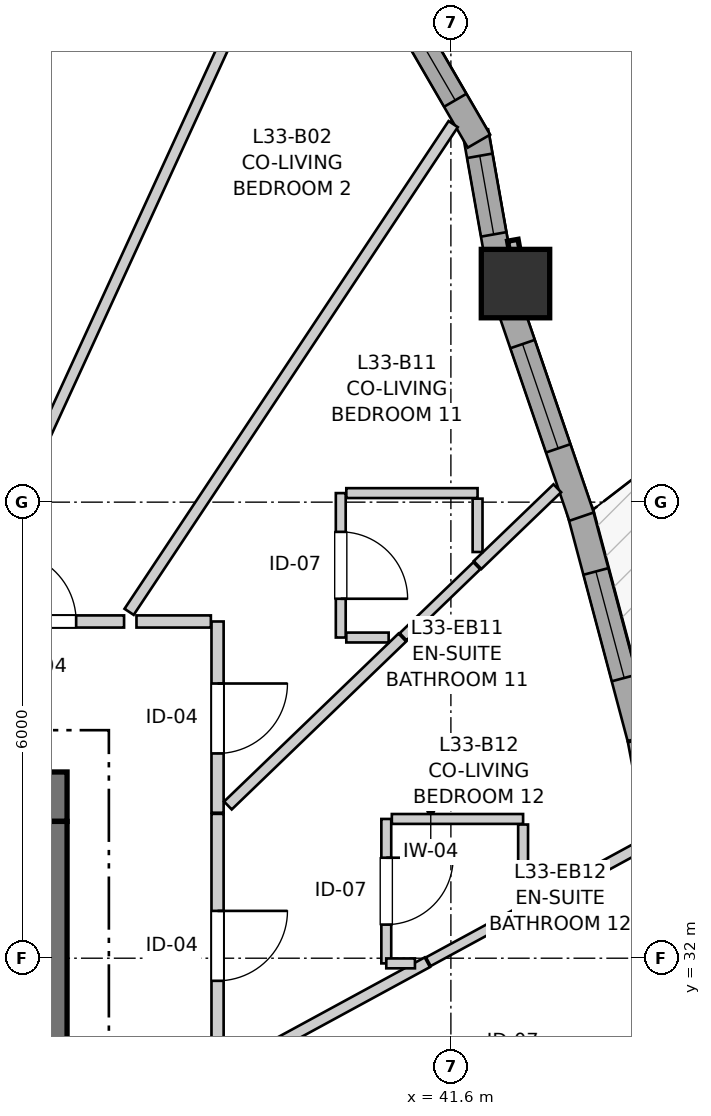
"""IFC4 building model, lengths in metres.
Left out: names, types, materials, properties, quantities, classifications, styles, units other than length and angle.
Written with IfcOpenShell. Run it as: python <this file> out.ifc"""

import sys

from ifc_helpers import new_model, si_unit, direction, frame, frame_2d, origin, origin_2d, place, context, subcontext, project, spatial, rectangle, extrude, source, transform, mapped, element, fill, save


model = new_model("IFC4")
c1 = context("Model", 3, precision=1e-05, world=origin(), true_north=direction((0.0, 1.0)))
c2 = subcontext(c1, "Body", "Model", "MODEL_VIEW")
j1 = project(units=[si_unit("LENGTHUNIT", "METRE"), si_unit("PLANEANGLEUNIT", "RADIAN")], contexts=[c1])
p1 = place(None, origin())
s1 = spatial("IfcSite", under=j1, at=p1, CompositionType="ELEMENT")
p2 = place(p1, origin())
s2 = spatial("IfcBuilding", under=s1, at=p2, CompositionType="ELEMENT")
p3 = place(p2, frame((0.0, 0.0, 112.0)))
s3 = spatial("IfcBuildingStorey", under=s2, at=p3, CompositionType="ELEMENT", Elevation=112.0)
p4 = place(p3, frame((36.55, 34.125, 0.0), z_axis=(0.0, 0.0, 1.0), x_axis=(-1.0, 0.0, 0.0)))
e1 = element("IfcWall", 1, at=p4, inside=s3, PredefinedType="SHEAR", context=c2, shape_type="SweptSolid", body=[
    extrude(rectangle(XDim=12.4, YDim=0.65, at=frame_2d((6.2, 0.0))), origin(), (0.0, 0.0, 1.0), 2.935),
])
p5 = place(p3, frame((36.225, 18.2, 0.0), z_axis=(0.0, 0.0, 1.0), x_axis=(0.0, 1.0, 0.0)))
e2 = element("IfcWall", 2, at=p5, inside=s3, PredefinedType="SHEAR", context=c2, shape_type="SweptSolid", body=[
    extrude(rectangle(XDim=15.6, YDim=0.65, at=frame_2d((7.8, 0.0))), origin(), (0.0, 0.0, 1.0), 2.935),
])
p6 = place(p5, frame((4.25, 0.0, 0.0)))
e3 = element("IfcOpeningElement", 3, at=p6, cuts=e2, PredefinedType="OPENING", context=c2, shape_type="SweptSolid", body=[
    extrude(rectangle(XDim=1.1, YDim=2.15, at=frame_2d((0.55, 1.075))), frame((0.0, 0.335, 0.0), z_axis=(0.0, -1.0, 0.0), x_axis=(1.0, 0.0, 0.0)), (0.0, 0.0, 1.0), 0.67),
])
p7 = place(p5, frame((10.25, 0.0, 0.0)))
e4 = element("IfcOpeningElement", 4, at=p7, cuts=e2, PredefinedType="OPENING", context=c2, shape_type="SweptSolid", body=[
    extrude(rectangle(XDim=1.1, YDim=2.15, at=frame_2d((0.55, 1.075))), frame((0.0, 0.335, 0.0), z_axis=(0.0, -1.0, 0.0), x_axis=(1.0, 0.0, 0.0)), (0.0, 0.0, 1.0), 0.67),
])
m1 = source(origin(), c2, "Body", "SweptSolid", [
    extrude(rectangle(XDim=0.9, YDim=0.9, at=origin_2d()), origin(), (0.0, 0.0, 1.0), 2.935),
])
p8 = place(p3, frame((42.45, 40.875, 0.0), z_axis=(0.0, 0.0, 1.0), x_axis=(1.0, 0.0, 0.0)))
e5 = element("IfcColumn", 5, at=p8, inside=s3, PredefinedType="COLUMN", context=c2, shape_type="MappedRepresentation", body=[
    mapped(m1, transform((0.0, 0.0, 0.0), x_axis=(1.0, 0.0, 0.0), y_axis=(0.0, 1.0, 0.0), z_axis=(0.0, 0.0, 1.0), scale=1.0)),
])
p9 = place(p3, frame((44.664, 31.881, 0.0), z_axis=(0.0, 0.0, 1.0), x_axis=(-0.18665909876, 0.982424745642, 0.0)))
e6 = element("IfcWall", 6, at=p9, inside=s3, PredefinedType="SOLIDWALL", context=c2, shape_type="SweptSolid", body=[
    extrude(rectangle(XDim=3.046, YDim=0.34, at=frame_2d((1.523, 0.0))), origin(), (0.0, 0.0, 1.0), 2.465),
])
p10 = place(p9, frame((0.416, 0.0, 0.82)))
e7 = element("IfcOpeningElement", 7, at=p10, cuts=e6, PredefinedType="OPENING", context=c2, shape_type="SweptSolid", body=[
    extrude(rectangle(XDim=0.95, YDim=1.35, at=frame_2d((0.475, 0.675))), frame((0.0, 0.18, 0.0), z_axis=(0.0, -1.0, 0.0), x_axis=(1.0, 0.0, 0.0)), (0.0, 0.0, 1.0), 0.36),
])
p11 = place(p9, frame((2.054, 0.0, 0.82)))
e8 = element("IfcOpeningElement", 8, at=p11, cuts=e6, PredefinedType="OPENING", context=c2, shape_type="SweptSolid", body=[
    extrude(rectangle(XDim=0.58, YDim=1.35, at=frame_2d((0.29, 0.675))), frame((0.0, 0.18, 0.0), z_axis=(0.0, -1.0, 0.0), x_axis=(1.0, 0.0, 0.0)), (0.0, 0.0, 1.0), 0.36),
])
p12 = place(p3, frame((44.09, 34.901, 0.0), z_axis=(0.0, 0.0, 1.0), x_axis=(-0.257108087637, 0.966382652613, 0.0)))
e9 = element("IfcWall", 9, at=p12, inside=s3, PredefinedType="SOLIDWALL", context=c2, shape_type="SweptSolid", body=[
    extrude(rectangle(XDim=3.096, YDim=0.34, at=frame_2d((1.548, 0.0))), origin(), (0.0, 0.0, 1.0), 2.465),
])
p13 = place(p12, frame((0.813, 0.0, 0.82)))
e10 = element("IfcOpeningElement", 10, at=p13, cuts=e9, PredefinedType="OPENING", context=c2, shape_type="SweptSolid", body=[
    extrude(rectangle(XDim=1.45, YDim=1.25, at=frame_2d((0.725, 0.625))), frame((0.0, 0.18, 0.0), z_axis=(0.0, -1.0, 0.0), x_axis=(1.0, 0.0, 0.0)), (0.0, 0.0, 1.0), 0.36),
])
p14 = place(p3, frame((43.319, 37.809, 0.0), z_axis=(0.0, 0.0, 1.0), x_axis=(-0.323586371726, 0.946198636669, 0.0)))
e11 = element("IfcWall", 11, at=p14, inside=s3, PredefinedType="SOLIDWALL", context=c2, shape_type="SweptSolid", body=[
    extrude(rectangle(XDim=2.952, YDim=0.34, at=frame_2d((1.476, 0.0))), origin(), (0.0, 0.0, 1.0), 2.465),
])
p15 = place(p14, frame((0.949, 0.0, 0.82)))
e12 = element("IfcOpeningElement", 12, at=p15, cuts=e11, PredefinedType="OPENING", context=c2, shape_type="SweptSolid", body=[
    extrude(rectangle(XDim=1.45, YDim=1.25, at=frame_2d((0.725, 0.625))), frame((0.0, 0.18, 0.0), z_axis=(0.0, -1.0, 0.0), x_axis=(1.0, 0.0, 0.0)), (0.0, 0.0, 1.0), 0.36),
])
p16 = place(p3, frame((42.242, 41.072, 0.0), z_axis=(0.0, 0.0, 1.0), x_axis=(-0.17440141227, 0.984674640375, 0.0)))
e13 = element("IfcWall", 13, at=p16, inside=s3, PredefinedType="SOLIDWALL", context=c2, shape_type="SweptSolid", body=[
    extrude(rectangle(XDim=1.831, YDim=0.34, at=frame_2d((0.916, 0.0))), origin(), (0.0, 0.0, 1.0), 2.465),
])
p17 = place(p16, frame((0.457, 0.0, 0.82)))
e14 = element("IfcOpeningElement", 14, at=p17, cuts=e13, PredefinedType="OPENING", context=c2, shape_type="SweptSolid", body=[
    extrude(rectangle(XDim=1.05, YDim=1.45, at=frame_2d((0.525, 0.725))), frame((0.0, 0.18, 0.0), z_axis=(0.0, -1.0, 0.0), x_axis=(1.0, 0.0, 0.0)), (0.0, 0.0, 1.0), 0.36),
])
p18 = place(p3, frame((41.969, 42.749, 0.0), z_axis=(0.0, 0.0, 1.0), x_axis=(-0.501989603552, 0.864873654313, 0.0)))
e15 = element("IfcWall", 15, at=p18, inside=s3, PredefinedType="SOLIDWALL", context=c2, shape_type="SweptSolid", body=[
    extrude(rectangle(XDim=2.099, YDim=0.34, at=frame_2d((1.05, 0.0))), origin(), (0.0, 0.0, 1.0), 2.465),
])
p19 = place(p18, frame((0.622, 0.0, 0.82)))
e16 = element("IfcOpeningElement", 16, at=p19, cuts=e15, PredefinedType="OPENING", context=c2, shape_type="SweptSolid", body=[
    extrude(rectangle(XDim=1.15, YDim=1.2, at=frame_2d((0.575, 0.6))), frame((0.0, 0.18, 0.0), z_axis=(0.0, -1.0, 0.0), x_axis=(1.0, 0.0, 0.0)), (0.0, 0.0, 1.0), 0.36),
])
p20 = place(p3, frame((38.53, 33.899, 0.0), z_axis=(0.0, 0.0, 1.0), x_axis=(0.0, -1.0, 0.0)))
e17 = element("IfcWall", 17, at=p20, inside=s3, PredefinedType="PARTITIONING", context=c2, shape_type="SweptSolid", body=[
    extrude(rectangle(XDim=3.469, YDim=0.16, at=frame_2d((1.734, 0.0))), origin(), (0.0, 0.0, 1.0), 2.935),
])
p21 = place(p20, frame((1.277, 0.0, 0.0)))
e18 = element("IfcOpeningElement", 18, at=p21, cuts=e17, PredefinedType="OPENING", context=c2, shape_type="SweptSolid", body=[
    extrude(rectangle(XDim=0.92, YDim=2.1, at=frame_2d((0.46, 1.05))), frame((0.0, 0.09, 0.0), z_axis=(0.0, -1.0, 0.0), x_axis=(1.0, 0.0, 0.0)), (0.0, 0.0, 1.0), 0.18),
])
p22 = place(p3, frame((38.53, 36.43, 0.0), z_axis=(0.0, 0.0, 1.0), x_axis=(0.0, -1.0, 0.0)))
e19 = element("IfcWall", 19, at=p22, inside=s3, PredefinedType="PARTITIONING", context=c2, shape_type="SweptSolid", body=[
    extrude(rectangle(XDim=2.516, YDim=0.16, at=frame_2d((1.258, 0.0))), origin(), (0.0, 0.0, 1.0), 2.573),
])
p23 = place(p22, frame((0.816, 0.0, 0.0)))
e20 = element("IfcOpeningElement", 20, at=p23, cuts=e19, PredefinedType="OPENING", context=c2, shape_type="SweptSolid", body=[
    extrude(rectangle(XDim=0.92, YDim=2.1, at=frame_2d((0.46, 1.05))), frame((0.0, 0.09, 0.0), z_axis=(0.0, -1.0, 0.0), x_axis=(1.0, 0.0, 0.0)), (0.0, 0.0, 1.0), 0.18),
])
p24 = place(p3, frame((35.121, 36.43, 0.0), z_axis=(0.0, 0.0, 1.0), x_axis=(1.0, 0.0, 0.0)))
e21 = element("IfcWall", 21, at=p24, inside=s3, PredefinedType="PARTITIONING", context=c2, shape_type="SweptSolid", body=[
    extrude(rectangle(XDim=2.179, YDim=0.16, at=frame_2d((1.089, 0.0))), origin(), (0.0, 0.0, 1.0), 2.573),
])
p25 = place(p24, frame((0.628, 0.0, 0.0)))
e22 = element("IfcOpeningElement", 22, at=p25, cuts=e21, PredefinedType="OPENING", context=c2, shape_type="SweptSolid", body=[
    extrude(rectangle(XDim=0.92, YDim=2.1, at=frame_2d((0.46, 1.05))), frame((0.0, 0.09, 0.0), z_axis=(0.0, -1.0, 0.0), x_axis=(1.0, 0.0, 0.0)), (0.0, 0.0, 1.0), 0.18),
])
p26 = place(p3, frame((40.75, 33.832, 0.0), z_axis=(0.0, 0.0, 1.0), x_axis=(0.0, -1.0, 0.0)))
e23 = element("IfcWall", 23, at=p26, inside=s3, PredefinedType="PARTITIONING", context=c2, shape_type="SweptSolid", body=[
    extrude(rectangle(XDim=1.9, YDim=0.13, at=frame_2d((0.95, 0.0))), origin(), (0.0, 0.0, 1.0), 2.935),
])
p27 = place(p26, frame((0.51, 0.0, 0.0)))
e24 = element("IfcOpeningElement", 24, at=p27, cuts=e23, PredefinedType="OPENING", context=c2, shape_type="SweptSolid", body=[
    extrude(rectangle(XDim=0.88, YDim=2.05, at=frame_2d((0.44, 1.025))), frame((0.0, 0.075, 0.0), z_axis=(0.0, -1.0, 0.0), x_axis=(1.0, 0.0, 0.0)), (0.0, 0.0, 1.0), 0.15),
])
p28 = place(p3, frame((40.151, 38.119, 0.0), z_axis=(0.0, 0.0, 1.0), x_axis=(0.0, -1.0, 0.0)))
e25 = element("IfcWall", 25, at=p28, inside=s3, PredefinedType="PARTITIONING", context=c2, shape_type="SweptSolid", body=[
    extrude(rectangle(XDim=1.9, YDim=0.13, at=frame_2d((0.95, 0.0))), origin(), (0.0, 0.0, 1.0), 2.935),
])
p29 = place(p28, frame((0.51, 0.0, 0.0)))
e26 = element("IfcOpeningElement", 26, at=p29, cuts=e25, PredefinedType="OPENING", context=c2, shape_type="SweptSolid", body=[
    extrude(rectangle(XDim=0.88, YDim=2.05, at=frame_2d((0.44, 1.025))), frame((0.0, 0.075, 0.0), z_axis=(0.0, -1.0, 0.0), x_axis=(1.0, 0.0, 0.0)), (0.0, 0.0, 1.0), 0.15),
])
p30 = place(p3, frame((35.191, 36.548, 0.0), z_axis=(0.0, 0.0, 1.0), x_axis=(0.417154036681, 0.908835799075, 0.0)))
e27 = element("IfcWall", 27, at=p30, inside=s3, PredefinedType="PARTITIONING", context=c2, shape_type="SweptSolid", body=[
    extrude(rectangle(XDim=9.949, YDim=0.145, at=frame_2d((4.974, 0.0))), origin(), (0.0, 0.0, 1.0), 2.935),
])
p31 = place(p3, frame((37.366, 36.557, 0.0), z_axis=(0.0, 0.0, 1.0), x_axis=(0.553463679146, 0.832873313215, 0.0)))
e28 = element("IfcWall", 28, at=p31, inside=s3, PredefinedType="PARTITIONING", context=c2, shape_type="SweptSolid", body=[
    extrude(rectangle(XDim=7.704, YDim=0.145, at=frame_2d((3.852, 0.0))), origin(), (0.0, 0.0, 1.0), 2.935),
])
p32 = place(p3, frame((38.666, 34.009, 0.0), z_axis=(0.0, 0.0, 1.0), x_axis=(0.72031454127, 0.693647577402, 0.0)))
e29 = element("IfcWall", 29, at=p32, inside=s3, PredefinedType="PARTITIONING", context=c2, shape_type="SweptSolid", body=[
    extrude(rectangle(XDim=3.186, YDim=0.145, at=frame_2d((1.593, 0.0))), origin(), (0.0, 0.0, 1.0), 2.935),
])
p33 = place(p3, frame((38.652, 30.513, 0.0), z_axis=(0.0, 0.0, 1.0), x_axis=(0.878637115469, 0.47749012484, 0.0)))
e30 = element("IfcWall", 30, at=p33, inside=s3, PredefinedType="PARTITIONING", context=c2, shape_type="SweptSolid", body=[
    extrude(rectangle(XDim=3.003, YDim=0.145, at=frame_2d((1.501, 0.0))), origin(), (0.0, 0.0, 1.0), 2.935),
])
p34 = place(p3, frame((42.535, 32.624, 0.0), z_axis=(0.0, 0.0, 1.0), x_axis=(0.878631690287, 0.477500107669, 0.0)))
e31 = element("IfcWall", 31, at=p34, inside=s3, PredefinedType="PARTITIONING", context=c2, shape_type="SweptSolid", body=[
    extrude(rectangle(XDim=1.861, YDim=0.145, at=frame_2d((0.93, 0.0))), origin(), (0.0, 0.0, 1.0), 2.935),
])
p35 = place(p3, frame((40.224, 38.119, 0.0), z_axis=(0.0, 0.0, 1.0), x_axis=(1.0, 0.0, 0.0)))
e32 = element("IfcWall", 32, at=p35, inside=s3, PredefinedType="PARTITIONING", context=c2, shape_type="SweptSolid", body=[
    extrude(rectangle(XDim=1.727, YDim=0.13, at=frame_2d((0.863, 0.0))), origin(), (0.0, 0.0, 1.0), 2.935),
])
p36 = place(p3, frame((40.823, 33.832, 0.0), z_axis=(0.0, 0.0, 1.0), x_axis=(1.0, 0.0, 0.0)))
e33 = element("IfcWall", 33, at=p36, inside=s3, PredefinedType="PARTITIONING", context=c2, shape_type="SweptSolid", body=[
    extrude(rectangle(XDim=1.727, YDim=0.13, at=frame_2d((0.864, 0.0))), origin(), (0.0, 0.0, 1.0), 2.935),
])
p37 = place(p3, frame((41.951, 37.173, 0.0), z_axis=(0.0, 0.0, 1.0), x_axis=(0.720559112487, 0.693393514111, 0.0)))
e34 = element("IfcWall", 34, at=p37, inside=s3, PredefinedType="PARTITIONING", context=c2, shape_type="SweptSolid", body=[
    extrude(rectangle(XDim=1.456, YDim=0.145, at=frame_2d((0.728, 0.0))), origin(), (0.0, 0.0, 1.0), 2.935),
])
p38 = place(p3, frame((41.303, 31.954, 0.0), z_axis=(0.0, 0.0, 1.0), x_axis=(0.87855387187, 0.477643270885, 0.0)))
e35 = element("IfcWall", 35, at=p38, inside=s3, PredefinedType="PARTITIONING", context=c2, shape_type="SweptSolid", body=[
    extrude(rectangle(XDim=1.387, YDim=0.13, at=frame_2d((0.694, 0.0))), origin(), (0.0, 0.0, 1.0), 2.935),
])
p39 = place(p3, frame((40.972, 36.229, 0.0), z_axis=(0.0, 0.0, 1.0), x_axis=(0.72014550452, 0.693823069896, 0.0)))
e36 = element("IfcWall", 36, at=p39, inside=s3, PredefinedType="PARTITIONING", context=c2, shape_type="SweptSolid", body=[
    extrude(rectangle(XDim=1.345, YDim=0.13, at=frame_2d((0.672, 0.0))), origin(), (0.0, 0.0, 1.0), 2.935),
])
p40 = place(p3, frame((37.463, 36.43, 0.0), z_axis=(0.0, 0.0, 1.0), x_axis=(1.0, 0.0, 0.0)))
e37 = element("IfcWall", 37, at=p40, inside=s3, PredefinedType="PARTITIONING", context=c2, shape_type="SweptSolid", body=[
    extrude(rectangle(XDim=0.979, YDim=0.16, at=frame_2d((0.489, 0.0))), origin(), (0.0, 0.0, 1.0), 2.573),
])
p41 = place(p3, frame((42.55, 32.758, 0.0), z_axis=(0.0, 0.0, 1.0), x_axis=(0.0, 1.0, 0.0)))
e38 = element("IfcWall", 38, at=p41, inside=s3, PredefinedType="PARTITIONING", context=c2, shape_type="SweptSolid", body=[
    extrude(rectangle(XDim=1.001, YDim=0.13, at=frame_2d((0.5, 0.0))), origin(), (0.0, 0.0, 1.0), 2.935),
])
p42 = place(p3, frame((41.951, 37.344, 0.0), z_axis=(0.0, 0.0, 1.0), x_axis=(0.0, 1.0, 0.0)))
e39 = element("IfcWall", 39, at=p42, inside=s3, PredefinedType="PARTITIONING", context=c2, shape_type="SweptSolid", body=[
    extrude(rectangle(XDim=0.702, YDim=0.13, at=frame_2d((0.351, 0.0))), origin(), (0.0, 0.0, 1.0), 2.935),
])
p43 = place(p3, frame((40.224, 36.219, 0.0), z_axis=(0.0, 0.0, 1.0), x_axis=(1.0, 0.0, 0.0)))
e40 = element("IfcWall", 40, at=p43, inside=s3, PredefinedType="PARTITIONING", context=c2, shape_type="SweptSolid", body=[
    extrude(rectangle(XDim=0.557, YDim=0.13, at=frame_2d((0.278, 0.0))), origin(), (0.0, 0.0, 1.0), 2.935),
])
p44 = place(p3, frame((40.75, 31.932, 0.0), z_axis=(0.0, 0.0, 1.0), x_axis=(1.0, 0.0, 0.0)))
e41 = element("IfcWall", 41, at=p44, inside=s3, PredefinedType="PARTITIONING", context=c2, shape_type="SweptSolid", body=[
    extrude(rectangle(XDim=0.377, YDim=0.13, at=frame_2d((0.188, 0.0))), origin(), (0.0, 0.0, 1.0), 2.935),
])
m2 = source(origin(), c2, "Body", "SweptSolid", [
    extrude(rectangle(XDim=1.45, YDim=1.25, at=frame_2d((0.725, 0.625))), frame((0.0, 0.03, 0.0), z_axis=(0.0, -1.0, 0.0), x_axis=(1.0, 0.0, 0.0)), (0.0, 0.0, 1.0), 0.06),
])
p45 = place(p13, origin())
e42 = element("IfcWindow", 42, at=p45, inside=s3, PartitioningType="SINGLE_PANEL", PredefinedType="WINDOW", context=c2, shape_type="MappedRepresentation", body=[
    mapped(m2, transform((0.0, 0.0, 0.0), x_axis=(1.0, 0.0, 0.0), y_axis=(0.0, 1.0, 0.0), z_axis=(0.0, 0.0, 1.0), scale=1.0)),
])
fill(e10, e42)
p46 = place(p15, origin())
e43 = element("IfcWindow", 43, at=p46, inside=s3, PartitioningType="SINGLE_PANEL", PredefinedType="WINDOW", context=c2, shape_type="MappedRepresentation", body=[
    mapped(m2, transform((0.0, 0.0, 0.0), x_axis=(1.0, 0.0, 0.0), y_axis=(0.0, 1.0, 0.0), z_axis=(0.0, 0.0, 1.0), scale=1.0)),
])
fill(e12, e43)
m3 = source(origin(), c2, "Body", "SweptSolid", [
    extrude(rectangle(XDim=1.05, YDim=1.45, at=frame_2d((0.525, 0.725))), frame((0.0, 0.03, 0.0), z_axis=(0.0, -1.0, 0.0), x_axis=(1.0, 0.0, 0.0)), (0.0, 0.0, 1.0), 0.06),
])
p47 = place(p17, origin())
e44 = element("IfcWindow", 44, at=p47, inside=s3, PartitioningType="SINGLE_PANEL", PredefinedType="WINDOW", context=c2, shape_type="MappedRepresentation", body=[
    mapped(m3, transform((0.0, 0.0, 0.0), x_axis=(1.0, 0.0, 0.0), y_axis=(0.0, 1.0, 0.0), z_axis=(0.0, 0.0, 1.0), scale=1.0)),
])
fill(e14, e44)
m4 = source(origin(), c2, "Body", "SweptSolid", [
    extrude(rectangle(XDim=1.15, YDim=1.2, at=frame_2d((0.575, 0.6))), frame((0.0, 0.03, 0.0), z_axis=(0.0, -1.0, 0.0), x_axis=(1.0, 0.0, 0.0)), (0.0, 0.0, 1.0), 0.06),
])
p48 = place(p19, origin())
e45 = element("IfcWindow", 45, at=p48, inside=s3, PartitioningType="SINGLE_PANEL", PredefinedType="WINDOW", context=c2, shape_type="MappedRepresentation", body=[
    mapped(m4, transform((0.0, 0.0, 0.0), x_axis=(1.0, 0.0, 0.0), y_axis=(0.0, 1.0, 0.0), z_axis=(0.0, 0.0, 1.0), scale=1.0)),
])
fill(e16, e45)
m5 = source(origin(), c2, "Body", "SweptSolid", [
    extrude(rectangle(XDim=0.92, YDim=2.1, at=frame_2d((0.46, 1.05))), frame((0.0, 0.025, 0.0), z_axis=(0.0, -1.0, 0.0), x_axis=(1.0, 0.0, 0.0)), (0.0, 0.0, 1.0), 0.05),
])
p49 = place(p21, origin())
e46 = element("IfcDoor", 46, at=p49, inside=s3, OperationType="SINGLE_SWING_LEFT", PredefinedType="DOOR", context=c2, shape_type="MappedRepresentation", body=[
    mapped(m5, transform((0.0, 0.0, 0.0), x_axis=(1.0, 0.0, 0.0), y_axis=(0.0, 1.0, 0.0), z_axis=(0.0, 0.0, 1.0), scale=1.0)),
])
fill(e18, e46)
p50 = place(p23, origin())
e47 = element("IfcDoor", 47, at=p50, inside=s3, OperationType="SINGLE_SWING_LEFT", PredefinedType="DOOR", context=c2, shape_type="MappedRepresentation", body=[
    mapped(m5, transform((0.0, 0.0, 0.0), x_axis=(1.0, 0.0, 0.0), y_axis=(0.0, 1.0, 0.0), z_axis=(0.0, 0.0, 1.0), scale=1.0)),
])
fill(e20, e47)
p51 = place(p25, origin())
e48 = element("IfcDoor", 48, at=p51, inside=s3, OperationType="SINGLE_SWING_LEFT", PredefinedType="DOOR", context=c2, shape_type="MappedRepresentation", body=[
    mapped(m5, transform((0.0, 0.0, 0.0), x_axis=(1.0, 0.0, 0.0), y_axis=(0.0, 1.0, 0.0), z_axis=(0.0, 0.0, 1.0), scale=1.0)),
])
fill(e22, e48)
m6 = source(origin(), c2, "Body", "SweptSolid", [
    extrude(rectangle(XDim=0.88, YDim=2.05, at=frame_2d((0.44, 1.025))), frame((0.0, 0.025, 0.0), z_axis=(0.0, -1.0, 0.0), x_axis=(1.0, 0.0, 0.0)), (0.0, 0.0, 1.0), 0.05),
])
p52 = place(p27, origin())
e49 = element("IfcDoor", 49, at=p52, inside=s3, OperationType="SINGLE_SWING_LEFT", PredefinedType="DOOR", context=c2, shape_type="MappedRepresentation", body=[
    mapped(m6, transform((0.0, 0.0, 0.0), x_axis=(1.0, 0.0, 0.0), y_axis=(0.0, 1.0, 0.0), z_axis=(0.0, 0.0, 1.0), scale=1.0)),
])
fill(e24, e49)
p53 = place(p29, origin())
e50 = element("IfcDoor", 50, at=p53, inside=s3, OperationType="SINGLE_SWING_RIGHT", PredefinedType="DOOR", context=c2, shape_type="MappedRepresentation", body=[
    mapped(m6, transform((0.0, 0.0, 0.0), x_axis=(1.0, 0.0, 0.0), y_axis=(0.0, 1.0, 0.0), z_axis=(0.0, 0.0, 1.0), scale=1.0)),
])
fill(e26, e50)
save(model, sys.argv[1])
